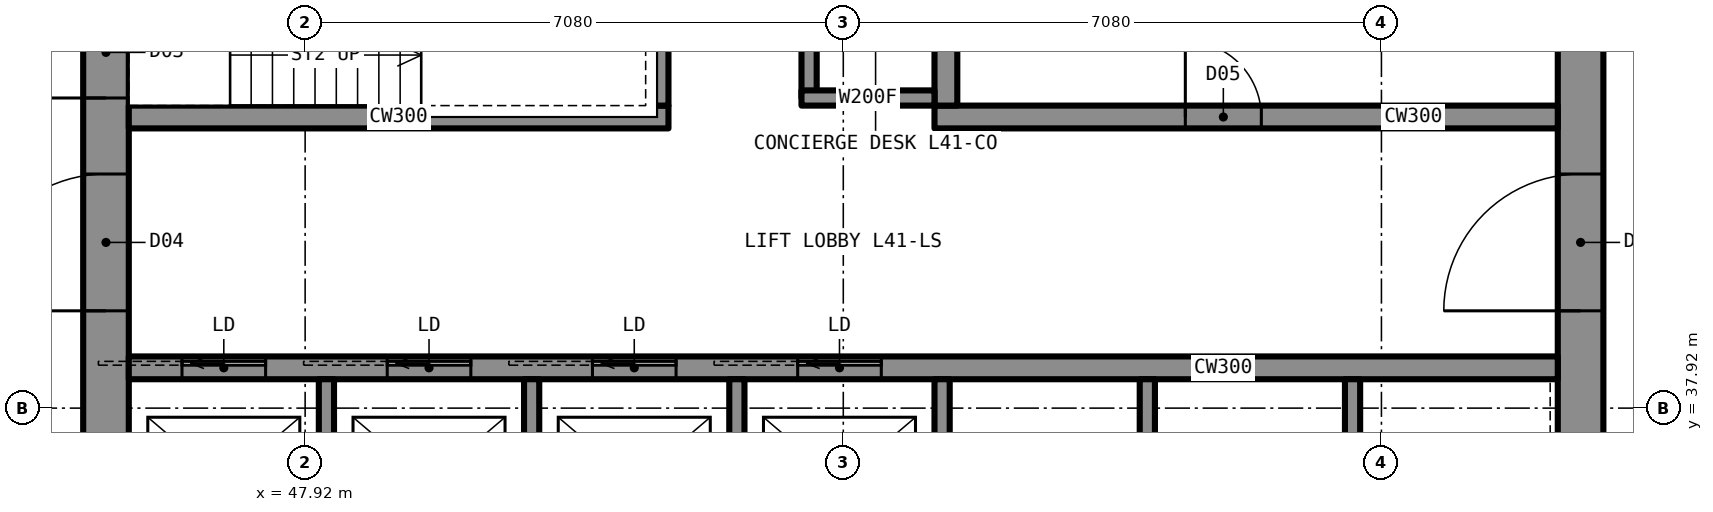
"""IFC4 building model, lengths in metres.
Left out: names, types, materials, properties, quantities, classifications, styles, units other than length and angle.
Written with IfcOpenShell. Run it as: python <this file> out.ifc"""

import sys

from ifc_helpers import new_model, si_unit, direction, frame, frame_2d, origin, place, context, subcontext, project, spatial, rectangle, extrude, element, fill, save


model = new_model("IFC4")
c1 = context("Model", 3, precision=1e-05, world=origin(), true_north=direction((0.0, 1.0)))
c2 = subcontext(c1, "Body", "Model", "MODEL_VIEW")
j1 = project(units=[si_unit("LENGTHUNIT", "METRE"), si_unit("PLANEANGLEUNIT", "RADIAN")], contexts=[c1])
p1 = place(None, origin())
s1 = spatial("IfcSite", under=j1, at=p1, CompositionType="ELEMENT")
p2 = place(p1, origin())
s2 = spatial("IfcBuilding", under=s1, at=p2, CompositionType="ELEMENT")
p3 = place(p2, frame((0.0, 0.0, 145.9)))
s3 = spatial("IfcBuildingStorey", under=s2, at=p3, CompositionType="ELEMENT", Elevation=145.9)
p4 = place(p3, frame((64.7, 35.6, 0.0), z_axis=(0.0, 0.0, 1.0), x_axis=(0.0, 1.0, 0.0)))
e1 = element("IfcWall", 1, at=p4, inside=s3, PredefinedType="SHEAR", context=c2, shape_type="SweptSolid", body=[
    extrude(rectangle(XDim=18.8, YDim=0.6, at=frame_2d((9.4, 0.0))), origin(), (0.0, 0.0, 1.0), 3.5),
])
p5 = place(p4, frame((13.4, 0.0, 0.0)))
e2 = element("IfcOpeningElement", 2, at=p5, cuts=e1, PredefinedType="OPENING", context=c2, shape_type="SweptSolid", body=[
    extrude(rectangle(XDim=1.8, YDim=2.2, at=frame_2d((0.9, 1.1))), frame((0.0, 0.31, 0.0), z_axis=(0.0, -1.0, 0.0), x_axis=(1.0, 0.0, 0.0)), (0.0, 0.0, 1.0), 0.62),
])
p6 = place(p4, frame((3.6, 0.0, 0.0)))
e3 = element("IfcOpeningElement", 3, at=p6, cuts=e1, PredefinedType="OPENING", context=c2, shape_type="SweptSolid", body=[
    extrude(rectangle(XDim=1.8, YDim=2.2, at=frame_2d((0.9, 1.1))), frame((0.0, 0.31, 0.0), z_axis=(0.0, -1.0, 0.0), x_axis=(1.0, 0.0, 0.0)), (0.0, 0.0, 1.0), 0.62),
])
p7 = place(p3, frame((45.3, 35.6, 0.0), z_axis=(0.0, 0.0, 1.0), x_axis=(0.0, 1.0, 0.0)))
e4 = element("IfcWall", 4, at=p7, inside=s3, PredefinedType="SHEAR", context=c2, shape_type="SweptSolid", body=[
    extrude(rectangle(XDim=18.8, YDim=0.6, at=frame_2d((9.4, 0.0))), origin(), (0.0, 0.0, 1.0), 3.5),
])
p8 = place(p7, frame((13.4, 0.0, 0.0)))
e5 = element("IfcOpeningElement", 5, at=p8, cuts=e4, PredefinedType="OPENING", context=c2, shape_type="SweptSolid", body=[
    extrude(rectangle(XDim=1.8, YDim=2.2, at=frame_2d((0.9, 1.1))), frame((0.0, 0.31, 0.0), z_axis=(0.0, -1.0, 0.0), x_axis=(1.0, 0.0, 0.0)), (0.0, 0.0, 1.0), 0.62),
])
p9 = place(p7, frame((3.6, 0.0, 0.0)))
e6 = element("IfcOpeningElement", 6, at=p9, cuts=e4, PredefinedType="OPENING", context=c2, shape_type="SweptSolid", body=[
    extrude(rectangle(XDim=1.8, YDim=2.2, at=frame_2d((0.9, 1.1))), frame((0.0, 0.31, 0.0), z_axis=(0.0, -1.0, 0.0), x_axis=(1.0, 0.0, 0.0)), (0.0, 0.0, 1.0), 0.62),
])
p10 = place(p7, frame((6.4, 0.0, 0.0)))
e7 = element("IfcOpeningElement", 7, at=p10, cuts=e4, PredefinedType="OPENING", context=c2, shape_type="SweptSolid", body=[
    extrude(rectangle(XDim=1.2, YDim=2.2, at=frame_2d((0.6, 1.1))), frame((0.0, 0.31, 0.0), z_axis=(0.0, -1.0, 0.0), x_axis=(1.0, 0.0, 0.0)), (0.0, 0.0, 1.0), 0.62),
])
p11 = place(p3, frame((45.6, 38.45, 0.0), z_axis=(0.0, 0.0, 1.0), x_axis=(1.0, 0.0, 0.0)))
e8 = element("IfcWall", 8, at=p11, inside=s3, PredefinedType="SHEAR", context=c2, shape_type="SweptSolid", body=[
    extrude(rectangle(XDim=18.8, YDim=0.3, at=frame_2d((9.4, 0.0))), origin(), (0.0, 0.0, 1.0), 3.5),
])
p12 = place(p3, frame((45.6, 41.75, 0.0), z_axis=(0.0, 0.0, 1.0), x_axis=(1.0, 0.0, 0.0)))
e9 = element("IfcWall", 9, at=p12, inside=s3, PredefinedType="SHEAR", context=c2, shape_type="SweptSolid", body=[
    extrude(rectangle(XDim=7.1, YDim=0.3, at=frame_2d((3.55, 0.0))), origin(), (0.0, 0.0, 1.0), 3.5),
])
p13 = place(p3, frame((56.2, 41.75, 0.0), z_axis=(0.0, 0.0, 1.0), x_axis=(1.0, 0.0, 0.0)))
e10 = element("IfcWall", 10, at=p13, inside=s3, PredefinedType="SHEAR", context=c2, shape_type="SweptSolid", body=[
    extrude(rectangle(XDim=8.2, YDim=0.3, at=frame_2d((4.1, 0.0))), origin(), (0.0, 0.0, 1.0), 3.5),
])
p14 = place(p13, frame((3.3, 0.0, 0.0)))
e11 = element("IfcOpeningElement", 11, at=p14, cuts=e10, PredefinedType="OPENING", context=c2, shape_type="SweptSolid", body=[
    extrude(rectangle(XDim=1.0, YDim=2.1, at=frame_2d((0.5, 1.05))), frame((0.0, 0.16, 0.0), z_axis=(0.0, -1.0, 0.0), x_axis=(1.0, 0.0, 0.0)), (0.0, 0.0, 1.0), 0.32),
])
p15 = place(p3, frame((52.55, 41.9, 0.0), z_axis=(0.0, 0.0, 1.0), x_axis=(0.0, 1.0, 0.0)))
e12 = element("IfcWall", 12, at=p15, inside=s3, PredefinedType="SHEAR", context=c2, shape_type="SweptSolid", body=[
    extrude(rectangle(XDim=6.2, YDim=0.3, at=frame_2d((3.1, 0.0))), origin(), (0.0, 0.0, 1.0), 3.5),
])
p16 = place(p15, frame((4.125, 0.0, 0.0)))
e13 = element("IfcOpeningElement", 13, at=p16, cuts=e12, PredefinedType="OPENING", context=c2, shape_type="SweptSolid", body=[
    extrude(rectangle(XDim=1.2, YDim=2.2, at=frame_2d((0.6, 1.1))), frame((0.0, 0.16, 0.0), z_axis=(0.0, -1.0, 0.0), x_axis=(1.0, 0.0, 0.0)), (0.0, 0.0, 1.0), 0.32),
])
p17 = place(p3, frame((56.35, 41.9, 0.0), z_axis=(0.0, 0.0, 1.0), x_axis=(0.0, 1.0, 0.0)))
e14 = element("IfcWall", 14, at=p17, inside=s3, PredefinedType="SHEAR", context=c2, shape_type="SweptSolid", body=[
    extrude(rectangle(XDim=9.5, YDim=0.3, at=frame_2d((4.75, 0.0))), origin(), (0.0, 0.0, 1.0), 3.5),
])
p18 = place(p17, frame((7.1, 0.0, 0.0)))
e15 = element("IfcOpeningElement", 15, at=p18, cuts=e14, PredefinedType="OPENING", context=c2, shape_type="SweptSolid", body=[
    extrude(rectangle(XDim=1.8, YDim=2.2, at=frame_2d((0.9, 1.1))), frame((0.0, 0.16, 0.0), z_axis=(0.0, -1.0, 0.0), x_axis=(1.0, 0.0, 0.0)), (0.0, 0.0, 1.0), 0.32),
])
p19 = place(p3, frame((54.35, 42.0, 0.0), z_axis=(0.0, 0.0, 1.0), x_axis=(0.0, 1.0, 0.0)))
e16 = element("IfcWall", 16, at=p19, inside=s3, PredefinedType="PARTITIONING", context=c2, shape_type="SweptSolid", body=[
    extrude(rectangle(XDim=1.7, YDim=0.2, at=frame_2d((0.85, 0.0))), origin(), (0.0, 0.0, 1.0), 3.33),
])
p20 = place(p19, frame((0.35, 0.0, 0.0)))
e17 = element("IfcOpeningElement", 17, at=p20, cuts=e16, PredefinedType="OPENING", context=c2, shape_type="SweptSolid", body=[
    extrude(rectangle(XDim=1.0, YDim=2.1, at=frame_2d((0.5, 1.05))), frame((0.0, 0.11, 0.0), z_axis=(0.0, -1.0, 0.0), x_axis=(1.0, 0.0, 0.0)), (0.0, 0.0, 1.0), 0.22),
])
p21 = place(p3, frame((54.25, 42.0, 0.0), z_axis=(0.0, 0.0, 1.0), x_axis=(1.0, 0.0, 0.0)))
e18 = element("IfcWall", 18, at=p21, inside=s3, PredefinedType="PARTITIONING", context=c2, shape_type="SweptSolid", body=[
    extrude(rectangle(XDim=1.95, YDim=0.2, at=frame_2d((0.975, 0.0))), origin(), (0.0, 0.0, 1.0), 3.33),
])
for number, where, z_axis, x_axis in (
    (19, (48.2, 35.6, 0.0), (0.0, 0.0, 1.0), (0.0, 1.0, 0.0)),
    (20, (50.9, 35.6, 0.0), (0.0, 0.0, 1.0), (0.0, 1.0, 0.0)),
    (21, (53.6, 35.6, 0.0), (0.0, 0.0, 1.0), (0.0, 1.0, 0.0)),
    (22, (56.3, 35.6, 0.0), (0.0, 0.0, 1.0), (0.0, 1.0, 0.0)),
    (23, (59.0, 35.6, 0.0), (0.0, 0.0, 1.0), (0.0, 1.0, 0.0)),
    (24, (61.7, 35.6, 0.0), (0.0, 0.0, 1.0), (0.0, 1.0, 0.0)),
):
    element("IfcWall", number, at=place(p3, frame(where, z_axis=z_axis, x_axis=x_axis)), inside=s3, PredefinedType="PARTITIONING", context=c2, shape_type="SweptSolid", body=[
        extrude(rectangle(XDim=2.7, YDim=0.2, at=frame_2d((1.35, 0.0))), origin(), (0.0, 0.0, 1.0), 3.33),
    ])
p22 = place(p20, origin())
e25 = element("IfcDoor", 25, at=p22, inside=s3, OperationType="SINGLE_SWING_LEFT", PredefinedType="DOOR", context=c2, shape_type="SweptSolid", body=[
    extrude(rectangle(XDim=1.0, YDim=2.1, at=frame_2d((0.5, 1.05))), frame((0.0, 0.025, 0.0), z_axis=(0.0, -1.0, 0.0), x_axis=(1.0, 0.0, 0.0)), (0.0, 0.0, 1.0), 0.05),
])
fill(e17, e25)
p23 = place(p9, origin())
e26 = element("IfcDoor", 26, at=p23, inside=s3, OperationType="DOUBLE_DOOR_SINGLE_SWING", PredefinedType="DOOR", context=c2, shape_type="SweptSolid", body=[
    extrude(rectangle(XDim=1.8, YDim=2.2, at=frame_2d((0.9, 1.1))), frame((0.0, 0.025, 0.0), z_axis=(0.0, -1.0, 0.0), x_axis=(1.0, 0.0, 0.0)), (0.0, 0.0, 1.0), 0.05),
])
fill(e6, e26)
p24 = place(p6, origin())
e27 = element("IfcDoor", 27, at=p24, inside=s3, OperationType="DOUBLE_DOOR_SINGLE_SWING", PredefinedType="DOOR", context=c2, shape_type="SweptSolid", body=[
    extrude(rectangle(XDim=1.8, YDim=2.2, at=frame_2d((0.9, 1.1))), frame((0.0, 0.025, 0.0), z_axis=(0.0, -1.0, 0.0), x_axis=(1.0, 0.0, 0.0)), (0.0, 0.0, 1.0), 0.05),
])
fill(e3, e27)
p25 = place(p10, origin())
e28 = element("IfcDoor", 28, at=p25, inside=s3, OperationType="SINGLE_SWING_LEFT", PredefinedType="DOOR", context=c2, shape_type="SweptSolid", body=[
    extrude(rectangle(XDim=1.2, YDim=2.2, at=frame_2d((0.6, 1.1))), frame((0.0, 0.025, 0.0), z_axis=(0.0, -1.0, 0.0), x_axis=(1.0, 0.0, 0.0)), (0.0, 0.0, 1.0), 0.05),
])
fill(e7, e28)
p26 = place(p14, origin())
e29 = element("IfcDoor", 29, at=p26, inside=s3, OperationType="SINGLE_SWING_LEFT", PredefinedType="DOOR", context=c2, shape_type="SweptSolid", body=[
    extrude(rectangle(XDim=1.0, YDim=2.1, at=frame_2d((0.5, 1.05))), frame((0.0, 0.025, 0.0), z_axis=(0.0, -1.0, 0.0), x_axis=(1.0, 0.0, 0.0)), (0.0, 0.0, 1.0), 0.05),
])
fill(e11, e29)
save(model, sys.argv[1])
